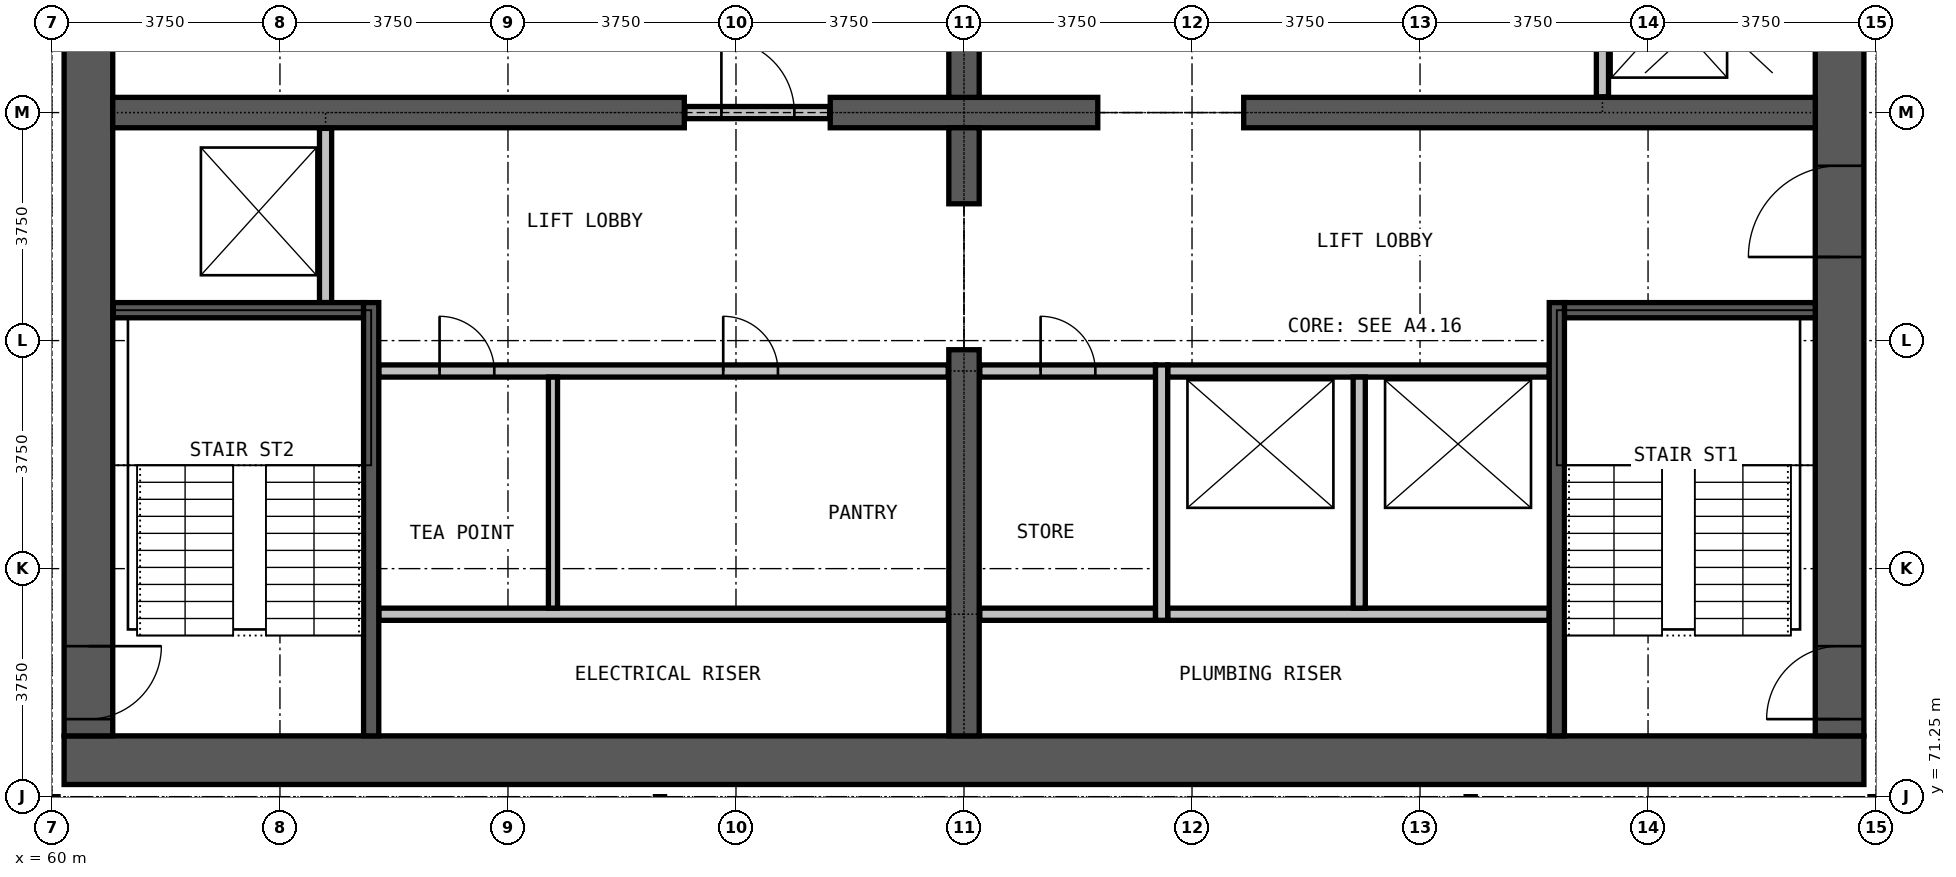
"""IFC4 building model, lengths in metres.
Left out: names, types, materials, properties, quantities, classifications, styles, units other than length and angle.
Written with IfcOpenShell. Run it as: python <this file> out.ifc"""

import sys

from ifc_helpers import new_model, si_unit, direction, frame, frame_2d, origin, place, context, subcontext, project, spatial, rectangle, extrude, element, fill, save


model = new_model("IFC4")
c1 = context("Model", 3, precision=1e-05, world=origin(), true_north=direction((0.0, 1.0)))
c2 = subcontext(c1, "Body", "Model", "MODEL_VIEW")
j1 = project(units=[si_unit("LENGTHUNIT", "METRE"), si_unit("PLANEANGLEUNIT", "RADIAN")], contexts=[c1])
p1 = place(None, origin())
s1 = spatial("IfcSite", under=j1, at=p1, CompositionType="ELEMENT")
p2 = place(p1, origin())
s2 = spatial("IfcBuilding", under=s1, at=p2, CompositionType="ELEMENT")
p3 = place(p2, frame((0.0, 0.0, 147.7)))
s3 = spatial("IfcBuildingStorey", under=s2, at=p3, CompositionType="ELEMENT", Elevation=147.7)
p4 = place(p3, frame((60.2, 71.85, 0.0), z_axis=(0.0, 0.0, 1.0), x_axis=(1.0, 0.0, 0.0)))
e1 = element("IfcWall", 1, at=p4, inside=s3, PredefinedType="SHEAR", context=c2, shape_type="SweptSolid", body=[
    extrude(rectangle(XDim=29.6, YDim=0.8, at=frame_2d((14.8, 0.0))), origin(), (0.0, 0.0, 1.0), 3.6),
])
p5 = place(p3, frame((89.4, 72.25, 0.0), z_axis=(0.0, 0.0, 1.0), x_axis=(0.0, 1.0, 0.0)))
e2 = element("IfcWall", 2, at=p5, inside=s3, PredefinedType="SHEAR", context=c2, shape_type="SweptSolid", body=[
    extrude(rectangle(XDim=20.5, YDim=0.8, at=frame_2d((10.25, 0.0))), origin(), (0.0, 0.0, 1.0), 3.6),
])
p6 = place(p5, frame((0.275, 0.0, 0.0)))
e3 = element("IfcOpeningElement", 3, at=p6, cuts=e2, PredefinedType="OPENING", context=c2, shape_type="SweptSolid", body=[
    extrude(rectangle(XDim=1.2, YDim=2.2, at=frame_2d((0.6, 1.1))), frame((0.0, 0.41, 0.0), z_axis=(0.0, -1.0, 0.0), x_axis=(1.0, 0.0, 0.0)), (0.0, 0.0, 1.0), 0.82),
])
p7 = place(p5, frame((13.775, 0.0, 0.0)))
e4 = element("IfcOpeningElement", 4, at=p7, cuts=e2, PredefinedType="OPENING", context=c2, shape_type="SweptSolid", body=[
    extrude(rectangle(XDim=1.2, YDim=2.2, at=frame_2d((0.6, 1.1))), frame((0.0, 0.41, 0.0), z_axis=(0.0, -1.0, 0.0), x_axis=(1.0, 0.0, 0.0)), (0.0, 0.0, 1.0), 0.82),
])
p8 = place(p5, frame((7.875, 0.0, 0.0)))
e5 = element("IfcOpeningElement", 5, at=p8, cuts=e2, PredefinedType="OPENING", context=c2, shape_type="SweptSolid", body=[
    extrude(rectangle(XDim=1.5, YDim=2.2, at=frame_2d((0.75, 1.1))), frame((0.0, 0.41, 0.0), z_axis=(0.0, -1.0, 0.0), x_axis=(1.0, 0.0, 0.0)), (0.0, 0.0, 1.0), 0.82),
])
p9 = place(p3, frame((60.6, 92.75, 0.0), z_axis=(0.0, 0.0, 1.0), x_axis=(0.0, -1.0, 0.0)))
e6 = element("IfcWall", 6, at=p9, inside=s3, PredefinedType="SHEAR", context=c2, shape_type="SweptSolid", body=[
    extrude(rectangle(XDim=20.5, YDim=0.8, at=frame_2d((10.25, 0.0))), origin(), (0.0, 0.0, 1.0), 3.6),
])
p10 = place(p9, frame((19.025, 0.0, 0.0)))
e7 = element("IfcOpeningElement", 7, at=p10, cuts=e6, PredefinedType="OPENING", context=c2, shape_type="SweptSolid", body=[
    extrude(rectangle(XDim=1.2, YDim=2.2, at=frame_2d((0.6, 1.1))), frame((0.0, 0.41, 0.0), z_axis=(0.0, -1.0, 0.0), x_axis=(1.0, 0.0, 0.0)), (0.0, 0.0, 1.0), 0.82),
])
p11 = place(p9, frame((8.025, 0.0, 0.0)))
e8 = element("IfcOpeningElement", 8, at=p11, cuts=e6, PredefinedType="OPENING", context=c2, shape_type="SweptSolid", body=[
    extrude(rectangle(XDim=1.2, YDim=2.2, at=frame_2d((0.6, 1.1))), frame((0.0, 0.41, 0.0), z_axis=(0.0, -1.0, 0.0), x_axis=(1.0, 0.0, 0.0)), (0.0, 0.0, 1.0), 0.82),
])
p12 = place(p3, frame((61.0, 82.5, 0.0), z_axis=(0.0, 0.0, 1.0), x_axis=(1.0, 0.0, 0.0)))
e9 = element("IfcWall", 9, at=p12, inside=s3, PredefinedType="SHEAR", context=c2, shape_type="SweptSolid", body=[
    extrude(rectangle(XDim=9.4, YDim=0.5, at=frame_2d((4.7, 0.0))), origin(), (0.0, 0.0, 1.0), 3.6),
])
p13 = place(p3, frame((72.8, 82.5, 0.0), z_axis=(0.0, 0.0, 1.0), x_axis=(1.0, 0.0, 0.0)))
e10 = element("IfcWall", 10, at=p13, inside=s3, PredefinedType="SHEAR", context=c2, shape_type="SweptSolid", body=[
    extrude(rectangle(XDim=4.4, YDim=0.5, at=frame_2d((2.2, 0.0))), origin(), (0.0, 0.0, 1.0), 3.6),
])
p14 = place(p3, frame((79.6, 82.5, 0.0), z_axis=(0.0, 0.0, 1.0), x_axis=(1.0, 0.0, 0.0)))
e11 = element("IfcWall", 11, at=p14, inside=s3, PredefinedType="SHEAR", context=c2, shape_type="SweptSolid", body=[
    extrude(rectangle(XDim=9.4, YDim=0.5, at=frame_2d((4.7, 0.0))), origin(), (0.0, 0.0, 1.0), 3.6),
])
p15 = place(p3, frame((75.0, 72.25, 0.0), z_axis=(0.0, 0.0, 1.0), x_axis=(0.0, 1.0, 0.0)))
e12 = element("IfcWall", 12, at=p15, inside=s3, PredefinedType="SHEAR", context=c2, shape_type="SweptSolid", body=[
    extrude(rectangle(XDim=6.35, YDim=0.5, at=frame_2d((3.175, 0.0))), origin(), (0.0, 0.0, 1.0), 3.6),
])
for number, where, z_axis, x_axis in (
    (13, (75.0, 81.0, 0.0), (0.0, 0.0, 1.0), (0.0, 1.0, 0.0)),
    (14, (75.0, 82.75, 0.0), (0.0, 0.0, 1.0), (0.0, 1.0, 0.0)),
):
    element("IfcWall", number, at=place(p3, frame(where, z_axis=z_axis, x_axis=x_axis)), inside=s3, PredefinedType="SHEAR", context=c2, shape_type="SweptSolid", body=[
        extrude(rectangle(XDim=1.25, YDim=0.5, at=frame_2d((0.625, 0.0))), origin(), (0.0, 0.0, 1.0), 3.6),
    ])
p16 = place(p3, frame((65.375, 74.25, 0.0), z_axis=(0.0, 0.0, 1.0), x_axis=(1.0, 0.0, 0.0)))
e15 = element("IfcWall", 15, at=p16, inside=s3, PredefinedType="PARTITIONING", context=c2, shape_type="SweptSolid", body=[
    extrude(rectangle(XDim=9.365, YDim=0.2, at=frame_2d((4.683, 0.0))), origin(), (0.0, 0.0, 1.0), 3.3),
])
p17 = place(p3, frame((75.26, 74.25, 0.0), z_axis=(0.0, 0.0, 1.0), x_axis=(1.0, 0.0, 0.0)))
e16 = element("IfcWall", 16, at=p17, inside=s3, PredefinedType="PARTITIONING", context=c2, shape_type="SweptSolid", body=[
    extrude(rectangle(XDim=2.89, YDim=0.2, at=frame_2d((1.445, 0.0))), origin(), (0.0, 0.0, 1.0), 3.3),
])
p18 = place(p3, frame((65.375, 78.25, 0.0), z_axis=(0.0, 0.0, 1.0), x_axis=(1.0, 0.0, 0.0)))
e17 = element("IfcWall", 17, at=p18, inside=s3, PredefinedType="PARTITIONING", context=c2, shape_type="SweptSolid", body=[
    extrude(rectangle(XDim=9.365, YDim=0.2, at=frame_2d((4.683, 0.0))), origin(), (0.0, 0.0, 1.0), 3.3),
])
p19 = place(p18, frame((1.0, 0.0, 0.0)))
e18 = element("IfcOpeningElement", 18, at=p19, cuts=e17, PredefinedType="OPENING", context=c2, shape_type="SweptSolid", body=[
    extrude(rectangle(XDim=0.9, YDim=2.2, at=frame_2d((0.45, 1.1))), frame((0.0, 0.11, 0.0), z_axis=(0.0, -1.0, 0.0), x_axis=(1.0, 0.0, 0.0)), (0.0, 0.0, 1.0), 0.22),
])
p20 = place(p18, frame((5.665, 0.0, 0.0)))
e19 = element("IfcOpeningElement", 19, at=p20, cuts=e17, PredefinedType="OPENING", context=c2, shape_type="SweptSolid", body=[
    extrude(rectangle(XDim=0.9, YDim=2.2, at=frame_2d((0.45, 1.1))), frame((0.0, 0.11, 0.0), z_axis=(0.0, -1.0, 0.0), x_axis=(1.0, 0.0, 0.0)), (0.0, 0.0, 1.0), 0.22),
])
p21 = place(p3, frame((75.26, 78.25, 0.0), z_axis=(0.0, 0.0, 1.0), x_axis=(1.0, 0.0, 0.0)))
e20 = element("IfcWall", 20, at=p21, inside=s3, PredefinedType="PARTITIONING", context=c2, shape_type="SweptSolid", body=[
    extrude(rectangle(XDim=2.89, YDim=0.2, at=frame_2d((1.445, 0.0))), origin(), (0.0, 0.0, 1.0), 3.3),
])
p22 = place(p21, frame((1.0, 0.0, 0.0)))
e21 = element("IfcOpeningElement", 21, at=p22, cuts=e20, PredefinedType="OPENING", context=c2, shape_type="SweptSolid", body=[
    extrude(rectangle(XDim=0.9, YDim=2.2, at=frame_2d((0.45, 1.1))), frame((0.0, 0.11, 0.0), z_axis=(0.0, -1.0, 0.0), x_axis=(1.0, 0.0, 0.0)), (0.0, 0.0, 1.0), 0.22),
])
p23 = place(p3, frame((70.41, 82.5, 0.0), z_axis=(0.0, 0.0, 1.0), x_axis=(1.0, 0.0, 0.0)))
e22 = element("IfcWall", 22, at=p23, inside=s3, PredefinedType="PARTITIONING", context=c2, shape_type="SweptSolid", body=[
    extrude(rectangle(XDim=2.38, YDim=0.2, at=frame_2d((1.19, 0.0))), origin(), (0.0, 0.0, 1.0), 2.4),
])
p24 = place(p23, frame((0.6, 0.0, 0.0)))
e23 = element("IfcOpeningElement", 23, at=p24, cuts=e22, PredefinedType="OPENING", context=c2, shape_type="SweptSolid", body=[
    extrude(rectangle(XDim=1.2, YDim=2.2, at=frame_2d((0.6, 1.1))), frame((0.0, 0.11, 0.0), z_axis=(0.0, -1.0, 0.0), x_axis=(1.0, 0.0, 0.0)), (0.0, 0.0, 1.0), 0.22),
])
p25 = place(p3, frame((68.24, 74.35, 0.0), z_axis=(0.0, 0.0, 1.0), x_axis=(0.0, 1.0, 0.0)))
e24 = element("IfcWall", 24, at=p25, inside=s3, PredefinedType="PARTITIONING", context=c2, shape_type="SweptSolid", body=[
    extrude(rectangle(XDim=3.8, YDim=0.15, at=frame_2d((1.9, 0.0))), origin(), (0.0, 0.0, 1.0), 3.3),
])
for number, where, z_axis, x_axis in (
    (25, (78.35, 74.25, 0.0), (0.0, 0.0, 1.0), (1.0, 0.0, 0.0)),
    (26, (78.35, 78.25, 0.0), (0.0, 0.0, 1.0), (1.0, 0.0, 0.0)),
):
    element("IfcWall", number, at=place(p3, frame(where, z_axis=z_axis, x_axis=x_axis)), inside=s3, PredefinedType="PARTITIONING", context=c2, shape_type="SweptSolid", body=[
        extrude(rectangle(XDim=6.275, YDim=0.2, at=frame_2d((3.137, 0.0))), origin(), (0.0, 0.0, 1.0), 3.3),
    ])
p26 = place(p3, frame((64.5, 79.375, 0.0), z_axis=(0.0, 0.0, 1.0), x_axis=(0.0, 1.0, 0.0)))
e27 = element("IfcWall", 27, at=p26, inside=s3, PredefinedType="PARTITIONING", context=c2, shape_type="SweptSolid", body=[
    extrude(rectangle(XDim=2.865, YDim=0.2, at=frame_2d((1.433, 0.0))), origin(), (0.0, 0.0, 1.0), 3.3),
])
p27 = place(p3, frame((78.25, 74.15, 0.0), z_axis=(0.0, 0.0, 1.0), x_axis=(0.0, 1.0, 0.0)))
e28 = element("IfcWall", 28, at=p27, inside=s3, PredefinedType="PARTITIONING", context=c2, shape_type="SweptSolid", body=[
    extrude(rectangle(XDim=4.2, YDim=0.2, at=frame_2d((2.1, 0.0))), origin(), (0.0, 0.0, 1.0), 3.3),
])
p28 = place(p3, frame((81.5, 74.35, 0.0), z_axis=(0.0, 0.0, 1.0), x_axis=(0.0, 1.0, 0.0)))
e29 = element("IfcWall", 29, at=p28, inside=s3, PredefinedType="PARTITIONING", context=c2, shape_type="SweptSolid", body=[
    extrude(rectangle(XDim=3.8, YDim=0.2, at=frame_2d((1.9, 0.0))), origin(), (0.0, 0.0, 1.0), 3.3),
])
p29 = place(p3, frame((85.5, 82.76, 0.0), z_axis=(0.0, 0.0, 1.0), x_axis=(0.0, 1.0, 0.0)))
e30 = element("IfcWall", 30, at=p29, inside=s3, PredefinedType="PARTITIONING", context=c2, shape_type="SweptSolid", body=[
    extrude(rectangle(XDim=2.865, YDim=0.2, at=frame_2d((1.433, 0.0))), origin(), (0.0, 0.0, 1.0), 3.3),
])
p30 = place(p29, frame((0.9, 0.0, 0.0)))
e31 = element("IfcOpeningElement", 31, at=p30, cuts=e30, PredefinedType="OPENING", context=c2, shape_type="SweptSolid", body=[
    extrude(rectangle(XDim=1.1, YDim=2.2, at=frame_2d((0.55, 1.1))), frame((0.0, 0.11, 0.0), z_axis=(0.0, -1.0, 0.0), x_axis=(1.0, 0.0, 0.0)), (0.0, 0.0, 1.0), 0.22),
])
p31 = place(p3, frame((61.01, 79.25, 0.0), z_axis=(0.0, 0.0, 1.0), x_axis=(1.0, 0.0, 0.0)))
e32 = element("IfcWall", 32, at=p31, inside=s3, PredefinedType="PARTITIONING", context=c2, shape_type="SweptSolid", body=[
    extrude(rectangle(XDim=4.115, YDim=0.25, at=frame_2d((2.058, 0.0))), origin(), (0.0, 0.0, 1.0), 3.3),
])
p32 = place(p3, frame((84.875, 79.25, 0.0), z_axis=(0.0, 0.0, 1.0), x_axis=(1.0, 0.0, 0.0)))
e33 = element("IfcWall", 33, at=p32, inside=s3, PredefinedType="PARTITIONING", context=c2, shape_type="SweptSolid", body=[
    extrude(rectangle(XDim=4.125, YDim=0.25, at=frame_2d((2.062, 0.0))), origin(), (0.0, 0.0, 1.0), 3.3),
])
for number, where, z_axis, x_axis in (
    (34, (65.25, 72.25, 0.0), (0.0, 0.0, 1.0), (0.0, 1.0, 0.0)),
    (35, (84.75, 72.25, 0.0), (0.0, 0.0, 1.0), (0.0, 1.0, 0.0)),
):
    element("IfcWall", number, at=place(p3, frame(where, z_axis=z_axis, x_axis=x_axis)), inside=s3, PredefinedType="PARTITIONING", context=c2, shape_type="SweptSolid", body=[
        extrude(rectangle(XDim=7.125, YDim=0.25, at=frame_2d((3.562, 0.0))), origin(), (0.0, 0.0, 1.0), 3.3),
    ])
p33 = place(p24, origin())
e36 = element("IfcDoor", 36, at=p33, inside=s3, OperationType="SINGLE_SWING_LEFT", PredefinedType="DOOR", context=c2, shape_type="SweptSolid", body=[
    extrude(rectangle(XDim=1.2, YDim=2.2, at=frame_2d((0.6, 1.1))), frame((0.0, 0.025, 0.0), z_axis=(0.0, -1.0, 0.0), x_axis=(1.0, 0.0, 0.0)), (0.0, 0.0, 1.0), 0.05),
])
fill(e23, e36)
p34 = place(p6, origin())
e37 = element("IfcDoor", 37, at=p34, inside=s3, OperationType="SINGLE_SWING_LEFT", PredefinedType="DOOR", context=c2, shape_type="SweptSolid", body=[
    extrude(rectangle(XDim=1.2, YDim=2.2, at=frame_2d((0.6, 1.1))), frame((0.0, 0.025, 0.0), z_axis=(0.0, -1.0, 0.0), x_axis=(1.0, 0.0, 0.0)), (0.0, 0.0, 1.0), 0.05),
])
fill(e3, e37)
p35 = place(p10, origin())
e38 = element("IfcDoor", 38, at=p35, inside=s3, OperationType="SINGLE_SWING_RIGHT", PredefinedType="DOOR", context=c2, shape_type="SweptSolid", body=[
    extrude(rectangle(XDim=1.2, YDim=2.2, at=frame_2d((0.6, 1.1))), frame((0.0, 0.025, 0.0), z_axis=(0.0, -1.0, 0.0), x_axis=(1.0, 0.0, 0.0)), (0.0, 0.0, 1.0), 0.05),
])
fill(e7, e38)
p36 = place(p8, origin())
e39 = element("IfcDoor", 39, at=p36, inside=s3, OperationType="DOUBLE_DOOR_SINGLE_SWING", PredefinedType="DOOR", context=c2, shape_type="SweptSolid", body=[
    extrude(rectangle(XDim=1.5, YDim=2.2, at=frame_2d((0.75, 1.1))), frame((0.0, 0.025, 0.0), z_axis=(0.0, -1.0, 0.0), x_axis=(1.0, 0.0, 0.0)), (0.0, 0.0, 1.0), 0.05),
])
fill(e5, e39)
p37 = place(p19, origin())
e40 = element("IfcDoor", 40, at=p37, inside=s3, OperationType="SINGLE_SWING_LEFT", PredefinedType="DOOR", context=c2, shape_type="SweptSolid", body=[
    extrude(rectangle(XDim=0.9, YDim=2.2, at=frame_2d((0.45, 1.1))), frame((0.0, 0.025, 0.0), z_axis=(0.0, -1.0, 0.0), x_axis=(1.0, 0.0, 0.0)), (0.0, 0.0, 1.0), 0.05),
])
fill(e18, e40)
p38 = place(p20, origin())
e41 = element("IfcDoor", 41, at=p38, inside=s3, OperationType="SINGLE_SWING_LEFT", PredefinedType="DOOR", context=c2, shape_type="SweptSolid", body=[
    extrude(rectangle(XDim=0.9, YDim=2.2, at=frame_2d((0.45, 1.1))), frame((0.0, 0.025, 0.0), z_axis=(0.0, -1.0, 0.0), x_axis=(1.0, 0.0, 0.0)), (0.0, 0.0, 1.0), 0.05),
])
fill(e19, e41)
p39 = place(p22, origin())
e42 = element("IfcDoor", 42, at=p39, inside=s3, OperationType="SINGLE_SWING_RIGHT", PredefinedType="DOOR", context=c2, shape_type="SweptSolid", body=[
    extrude(rectangle(XDim=0.9, YDim=2.2, at=frame_2d((0.45, 1.1))), frame((0.0, 0.025, 0.0), z_axis=(0.0, -1.0, 0.0), x_axis=(1.0, 0.0, 0.0)), (0.0, 0.0, 1.0), 0.05),
])
fill(e21, e42)
save(model, sys.argv[1])
